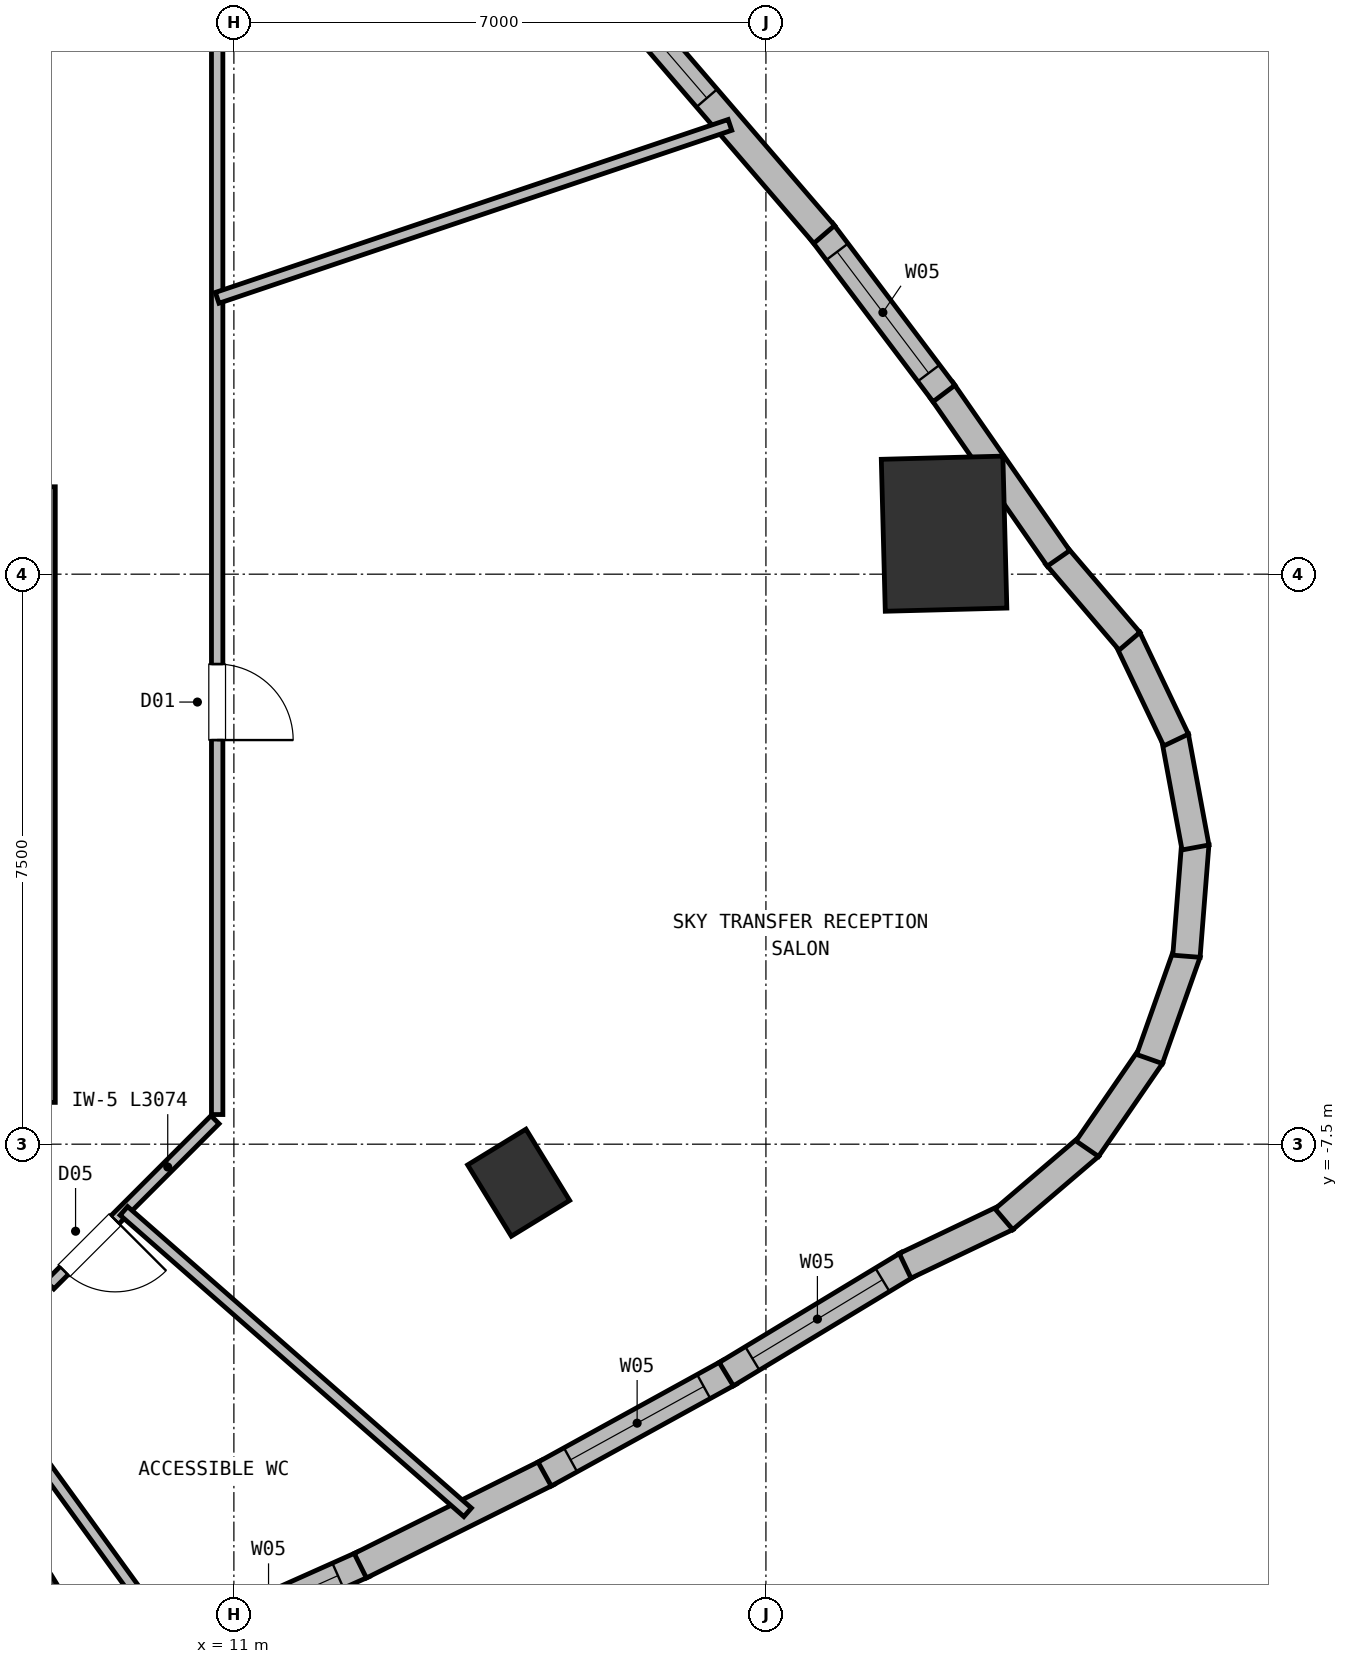
"""IFC4 building model, lengths in metres.
Left out: names, types, materials, properties, quantities, classifications, styles, units other than length and angle.
Written with IfcOpenShell. Run it as: python <this file> out.ifc"""

import sys

from ifc_helpers import new_model, si_unit, direction, frame, frame_2d, origin, origin_2d, place, context, subcontext, project, spatial, rectangle, extrude, element, fill, save


model = new_model("IFC4")
c1 = context("Model", 3, precision=1e-05, world=origin(), true_north=direction((0.0, 1.0)))
c2 = subcontext(c1, "Body", "Model", "MODEL_VIEW")
j1 = project(units=[si_unit("LENGTHUNIT", "METRE"), si_unit("PLANEANGLEUNIT", "RADIAN")], contexts=[c1])
p1 = place(None, origin())
s1 = spatial("IfcSite", under=j1, at=p1, CompositionType="ELEMENT")
p2 = place(p1, origin())
s2 = spatial("IfcBuilding", under=s1, at=p2, CompositionType="ELEMENT")
p3 = place(p2, frame((0.0, 0.0, 88.25)))
s3 = spatial("IfcBuildingStorey", under=s2, at=p3, CompositionType="ELEMENT", Elevation=88.25)
p4 = place(p3, frame((8.35, -6.95, 0.0), z_axis=(0.0, 0.0, 1.0), x_axis=(0.0, 1.0, 0.0)))
e1 = element("IfcWall", 1, at=p4, inside=s3, PredefinedType="SHEAR", context=c2, shape_type="SweptSolid", body=[
    extrude(rectangle(XDim=8.1, YDim=0.6, at=frame_2d((4.05, 0.0))), origin(), (0.0, 0.0, 1.0), 4.21),
])
for number, where, z_axis, x_axis in (
    (2, (8.504, -13.878, 0.0), (0.0, 0.0, 1.0), (0.853, 0.522, 0.0)),
    (3, (14.747, -8.007, 0.0), (0.0, 0.0, 1.0), (0.853, 0.522, 0.0)),
):
    element("IfcColumn", number, at=place(p3, frame(where, z_axis=z_axis, x_axis=x_axis)), inside=s3, PredefinedType="COLUMN", context=c2, shape_type="SweptSolid", body=[
        extrude(rectangle(XDim=0.9, YDim=1.1, at=origin_2d()), origin(), (0.0, 0.0, 1.0), 4.5),
    ])
p5 = place(p3, frame((20.344, 0.533, 0.0), z_axis=(0.0, 0.0, 1.0), x_axis=(0.999657324976, 0.026176948308, 0.0)))
e4 = element("IfcColumn", 4, at=p5, inside=s3, PredefinedType="COLUMN", context=c2, shape_type="SweptSolid", body=[
    extrude(rectangle(XDim=1.6, YDim=2.0, at=origin_2d()), origin(), (0.0, 0.0, 1.0), 4.5),
])
p6 = place(p3, frame((12.709, -13.025, 0.0), z_axis=(0.0, 0.0, 1.0), x_axis=(-0.913079911719, -0.407780669987, 0.0)))
e5 = element("IfcWall", 5, at=p6, inside=s3, PredefinedType="SOLIDWALL", context=c2, shape_type="SweptSolid", body=[
    extrude(rectangle(XDim=2.744, YDim=0.36, at=frame_2d((1.372, 0.0))), origin(), (0.0, 0.0, 1.0), 4.21),
])
p7 = place(p6, frame((0.372, 0.0, 0.72)))
e6 = element("IfcOpeningElement", 6, at=p7, cuts=e5, PredefinedType="OPENING", context=c2, shape_type="SweptSolid", body=[
    extrude(rectangle(XDim=2.0, YDim=2.15, at=frame_2d((1.0, 1.075))), frame((0.0, 0.19, 0.0), z_axis=(0.0, -1.0, 0.0), x_axis=(1.0, 0.0, 0.0)), (0.0, 0.0, 1.0), 0.38),
])
p8 = place(p3, frame((15.133, -11.817, 0.0), z_axis=(0.0, 0.0, 1.0), x_axis=(-0.89522231214, -0.445619806389, 0.0)))
e7 = element("IfcWall", 7, at=p8, inside=s3, PredefinedType="SOLIDWALL", context=c2, shape_type="SweptSolid", body=[
    extrude(rectangle(XDim=2.759, YDim=0.36, at=frame_2d((1.379, 0.0))), origin(), (0.0, 0.0, 1.0), 4.21),
])
p9 = place(p3, frame((17.522, -10.501, 0.0), z_axis=(0.0, 0.0, 1.0), x_axis=(-0.876024703061, -0.482266233139, 0.0)))
e8 = element("IfcWall", 8, at=p9, inside=s3, PredefinedType="SOLIDWALL", context=c2, shape_type="SweptSolid", body=[
    extrude(rectangle(XDim=2.778, YDim=0.36, at=frame_2d((1.389, 0.0))), origin(), (0.0, 0.0, 1.0), 4.21),
])
p10 = place(p9, frame((0.389, 0.0, 0.72)))
e9 = element("IfcOpeningElement", 9, at=p10, cuts=e8, PredefinedType="OPENING", context=c2, shape_type="SweptSolid", body=[
    extrude(rectangle(XDim=2.0, YDim=2.15, at=frame_2d((1.0, 1.075))), frame((0.0, 0.19, 0.0), z_axis=(0.0, -1.0, 0.0), x_axis=(1.0, 0.0, 0.0)), (0.0, 0.0, 1.0), 0.38),
])
p11 = place(p3, frame((19.876, -9.077, 0.0), z_axis=(0.0, 0.0, 1.0), x_axis=(-0.855749933122, -0.517389651967, 0.0)))
e10 = element("IfcWall", 10, at=p11, inside=s3, PredefinedType="SOLIDWALL", context=c2, shape_type="SweptSolid", body=[
    extrude(rectangle(XDim=2.801, YDim=0.36, at=frame_2d((1.4, 0.0))), origin(), (0.0, 0.0, 1.0), 4.21),
])
p12 = place(p11, frame((0.401, 0.0, 0.72)))
e11 = element("IfcOpeningElement", 11, at=p12, cuts=e10, PredefinedType="OPENING", context=c2, shape_type="SweptSolid", body=[
    extrude(rectangle(XDim=2.0, YDim=2.15, at=frame_2d((1.0, 1.075))), frame((0.0, 0.19, 0.0), z_axis=(0.0, -1.0, 0.0), x_axis=(1.0, 0.0, 0.0)), (0.0, 0.0, 1.0), 0.38),
])
p13 = place(p3, frame((21.173, -8.461, 0.0), z_axis=(0.0, 0.0, 1.0), x_axis=(-0.902523129088, -0.430641383823, 0.0)))
e12 = element("IfcWall", 12, at=p13, inside=s3, PredefinedType="SOLIDWALL", context=c2, shape_type="SweptSolid", body=[
    extrude(rectangle(XDim=1.486, YDim=0.36, at=frame_2d((0.743, 0.0))), origin(), (0.0, 0.0, 1.0), 4.21),
])
p14 = place(p3, frame((22.261, -7.523, 0.0), z_axis=(0.0, 0.0, 1.0), x_axis=(-0.760392276745, -0.649464075578, 0.0)))
e13 = element("IfcWall", 13, at=p14, inside=s3, PredefinedType="SOLIDWALL", context=c2, shape_type="SweptSolid", body=[
    extrude(rectangle(XDim=1.486, YDim=0.36, at=frame_2d((0.743, 0.0))), origin(), (0.0, 0.0, 1.0), 4.21),
])
p15 = place(p3, frame((23.07, -6.335, 0.0), z_axis=(0.0, 0.0, 1.0), x_axis=(-0.56647304132, -0.824080271247, 0.0)))
e14 = element("IfcWall", 14, at=p15, inside=s3, PredefinedType="SOLIDWALL", context=c2, shape_type="SweptSolid", body=[
    extrude(rectangle(XDim=1.486, YDim=0.36, at=frame_2d((0.743, 0.0))), origin(), (0.0, 0.0, 1.0), 4.21),
])
for number, where, z_axis, x_axis in (
    (15, (23.543, -4.979, 0.0), (0.0, 0.0, 1.0), (-0.334, -0.943, 0.0)),
    (16, (23.649, -3.546, 0.0), (0.0, 0.0, 1.0), (-0.078, -0.997, 0.0)),
    (17, (23.381, -2.135, 0.0), (0.0, 0.0, 1.0), (0.182, -0.983, 0.0)),
    (18, (22.757, -0.841, 0.0), (0.0, 0.0, 1.0), (0.431, -0.903, 0.0)),
):
    element("IfcWall", number, at=place(p3, frame(where, z_axis=z_axis, x_axis=x_axis)), inside=s3, PredefinedType="SOLIDWALL", context=c2, shape_type="SweptSolid", body=[
        extrude(rectangle(XDim=1.486, YDim=0.36, at=frame_2d((0.743, 0.0))), origin(), (0.0, 0.0, 1.0), 4.21),
    ])
p16 = place(p3, frame((21.819, 0.247, 0.0), z_axis=(0.0, 0.0, 1.0), x_axis=(0.649464075578, -0.760392276745, 0.0)))
e19 = element("IfcWall", 19, at=p16, inside=s3, PredefinedType="SOLIDWALL", context=c2, shape_type="SweptSolid", body=[
    extrude(rectangle(XDim=1.486, YDim=0.36, at=frame_2d((0.743, 0.0))), origin(), (0.0, 0.0, 1.0), 4.21),
])
p17 = place(p3, frame((20.313, 2.418, 0.0), z_axis=(0.0, 0.0, 1.0), x_axis=(0.570713634392, -0.821149162771, 0.0)))
e20 = element("IfcWall", 20, at=p17, inside=s3, PredefinedType="SOLIDWALL", context=c2, shape_type="SweptSolid", body=[
    extrude(rectangle(XDim=2.692, YDim=0.36, at=frame_2d((1.346, 0.0))), origin(), (0.0, 0.0, 1.0), 4.21),
])
p18 = place(p3, frame((18.735, 4.509, 0.0), z_axis=(0.0, 0.0, 1.0), x_axis=(0.602250802705, -0.798306940118, 0.0)))
e21 = element("IfcWall", 21, at=p18, inside=s3, PredefinedType="SOLIDWALL", context=c2, shape_type="SweptSolid", body=[
    extrude(rectangle(XDim=2.67, YDim=0.36, at=frame_2d((1.335, 0.0))), origin(), (0.0, 0.0, 1.0), 4.21),
])
p19 = place(p18, frame((0.335, 0.0, 0.72)))
e22 = element("IfcOpeningElement", 22, at=p19, cuts=e21, PredefinedType="OPENING", context=c2, shape_type="SweptSolid", body=[
    extrude(rectangle(XDim=2.0, YDim=2.15, at=frame_2d((1.0, 1.075))), frame((0.0, 0.19, 0.0), z_axis=(0.0, -1.0, 0.0), x_axis=(1.0, 0.0, 0.0)), (0.0, 0.0, 1.0), 0.38),
])
p20 = place(p3, frame((14.966, 8.887, 0.0), z_axis=(0.0, 0.0, 1.0), x_axis=(0.65220496226, -0.758042668458, 0.0)))
e23 = element("IfcWall", 23, at=p20, inside=s3, PredefinedType="SOLIDWALL", context=c2, shape_type="SweptSolid", body=[
    extrude(rectangle(XDim=5.827, YDim=0.36, at=frame_2d((2.914, 0.0))), origin(), (0.0, 0.0, 1.0), 4.21),
])
p21 = place(p20, frame((1.46, 0.0, 0.72)))
e24 = element("IfcOpeningElement", 24, at=p21, cuts=e23, PredefinedType="OPENING", context=c2, shape_type="SweptSolid", body=[
    extrude(rectangle(XDim=2.0, YDim=2.15, at=frame_2d((1.0, 1.075))), frame((0.0, 0.19, 0.0), z_axis=(0.0, -1.0, 0.0), x_axis=(1.0, 0.0, 0.0)), (0.0, 0.0, 1.0), 0.38),
])
p22 = place(p3, frame((10.752, -7.178, 0.0), z_axis=(0.0, 0.0, 1.0), x_axis=(-0.707067066127, -0.707146494016, 0.0)))
e25 = element("IfcWall", 25, at=p22, inside=s3, PredefinedType="PARTITIONING", context=c2, shape_type="SweptSolid", body=[
    extrude(rectangle(XDim=3.074, YDim=0.15, at=frame_2d((1.537, 0.0))), origin(), (0.0, 0.0, 1.0), 4.21),
])
p23 = place(p22, frame((1.86, 0.0, 0.0)))
e26 = element("IfcOpeningElement", 26, at=p23, cuts=e25, PredefinedType="OPENING", context=c2, shape_type="SweptSolid", body=[
    extrude(rectangle(XDim=0.95, YDim=2.1, at=frame_2d((0.475, 1.05))), frame((0.0, 0.085, 0.0), z_axis=(0.0, -1.0, 0.0), x_axis=(1.0, 0.0, 0.0)), (0.0, 0.0, 1.0), 0.17),
])
p24 = place(p3, frame((10.78, 7.11, 0.0), z_axis=(0.0, 0.0, 1.0), x_axis=(0.0, -1.0, 0.0)))
e27 = element("IfcWall", 27, at=p24, inside=s3, PredefinedType="PARTITIONING", context=c2, shape_type="SweptSolid", body=[
    extrude(rectangle(XDim=14.22, YDim=0.15, at=frame_2d((7.11, 0.0))), origin(), (0.0, 0.0, 1.0), 4.21),
])
p25 = place(p24, frame((8.292, 0.0, 0.0)))
e28 = element("IfcOpeningElement", 28, at=p25, cuts=e27, PredefinedType="OPENING", context=c2, shape_type="SweptSolid", body=[
    extrude(rectangle(XDim=1.0, YDim=2.15, at=frame_2d((0.5, 1.075))), frame((0.0, 0.085, 0.0), z_axis=(0.0, -1.0, 0.0), x_axis=(1.0, 0.0, 0.0)), (0.0, 0.0, 1.0), 0.17),
])
p26 = place(p3, frame((9.552, -8.377, 0.0), z_axis=(0.0, 0.0, 1.0), x_axis=(0.751819466932, -0.659369008327, 0.0)))
e29 = element("IfcWall", 29, at=p26, inside=s3, PredefinedType="PARTITIONING", context=c2, shape_type="SweptSolid", body=[
    extrude(rectangle(XDim=6.016, YDim=0.15, at=frame_2d((3.008, 0.0))), origin(), (0.0, 0.0, 1.0), 4.21),
])
p27 = place(p3, frame((10.78, 3.636, 0.0), z_axis=(0.0, 0.0, 1.0), x_axis=(0.947556026785, 0.319589699621, 0.0)))
e30 = element("IfcWall", 30, at=p27, inside=s3, PredefinedType="PARTITIONING", context=c2, shape_type="SweptSolid", body=[
    extrude(rectangle(XDim=7.12, YDim=0.15, at=frame_2d((3.56, 0.0))), origin(), (0.0, 0.0, 1.0), 4.21),
])
p28 = place(p3, frame((6.802, -9.38, 0.0), z_axis=(0.0, 0.0, 1.0), x_axis=(0.587049456682, -0.809551070291, 0.0)))
e31 = element("IfcWall", 31, at=p28, inside=s3, PredefinedType="PARTITIONING", context=c2, shape_type="SweptSolid", body=[
    extrude(rectangle(XDim=5.863, YDim=0.15, at=frame_2d((2.931, 0.0))), origin(), (0.0, 0.0, 1.0), 4.21),
])
p29 = place(p7, origin())
e32 = element("IfcWindow", 32, at=p29, inside=s3, PartitioningType="SINGLE_PANEL", PredefinedType="WINDOW", context=c2, shape_type="SweptSolid", body=[
    extrude(rectangle(XDim=2.0, YDim=2.15, at=frame_2d((1.0, 1.075))), frame((0.0, 0.03, 0.0), z_axis=(0.0, -1.0, 0.0), x_axis=(1.0, 0.0, 0.0)), (0.0, 0.0, 1.0), 0.06),
])
fill(e6, e32)
p30 = place(p10, origin())
e33 = element("IfcWindow", 33, at=p30, inside=s3, PartitioningType="SINGLE_PANEL", PredefinedType="WINDOW", context=c2, shape_type="SweptSolid", body=[
    extrude(rectangle(XDim=2.0, YDim=2.15, at=frame_2d((1.0, 1.075))), frame((0.0, 0.03, 0.0), z_axis=(0.0, -1.0, 0.0), x_axis=(1.0, 0.0, 0.0)), (0.0, 0.0, 1.0), 0.06),
])
fill(e9, e33)
p31 = place(p12, origin())
e34 = element("IfcWindow", 34, at=p31, inside=s3, PartitioningType="SINGLE_PANEL", PredefinedType="WINDOW", context=c2, shape_type="SweptSolid", body=[
    extrude(rectangle(XDim=2.0, YDim=2.15, at=frame_2d((1.0, 1.075))), frame((0.0, 0.03, 0.0), z_axis=(0.0, -1.0, 0.0), x_axis=(1.0, 0.0, 0.0)), (0.0, 0.0, 1.0), 0.06),
])
fill(e11, e34)
p32 = place(p19, origin())
e35 = element("IfcWindow", 35, at=p32, inside=s3, PartitioningType="SINGLE_PANEL", PredefinedType="WINDOW", context=c2, shape_type="SweptSolid", body=[
    extrude(rectangle(XDim=2.0, YDim=2.15, at=frame_2d((1.0, 1.075))), frame((0.0, 0.03, 0.0), z_axis=(0.0, -1.0, 0.0), x_axis=(1.0, 0.0, 0.0)), (0.0, 0.0, 1.0), 0.06),
])
fill(e22, e35)
p33 = place(p21, origin())
e36 = element("IfcWindow", 36, at=p33, inside=s3, PartitioningType="SINGLE_PANEL", PredefinedType="WINDOW", context=c2, shape_type="SweptSolid", body=[
    extrude(rectangle(XDim=2.0, YDim=2.15, at=frame_2d((1.0, 1.075))), frame((0.0, 0.03, 0.0), z_axis=(0.0, -1.0, 0.0), x_axis=(1.0, 0.0, 0.0)), (0.0, 0.0, 1.0), 0.06),
])
fill(e24, e36)
p34 = place(p23, origin())
e37 = element("IfcDoor", 37, at=p34, inside=s3, OperationType="SINGLE_SWING_LEFT", PredefinedType="DOOR", context=c2, shape_type="SweptSolid", body=[
    extrude(rectangle(XDim=0.95, YDim=2.1, at=frame_2d((0.475, 1.05))), frame((0.0, 0.025, 0.0), z_axis=(0.0, -1.0, 0.0), x_axis=(1.0, 0.0, 0.0)), (0.0, 0.0, 1.0), 0.05),
])
fill(e26, e37)
p35 = place(p25, origin())
e38 = element("IfcDoor", 38, at=p35, inside=s3, OperationType="SINGLE_SWING_RIGHT", PredefinedType="DOOR", context=c2, shape_type="SweptSolid", body=[
    extrude(rectangle(XDim=1.0, YDim=2.15, at=frame_2d((0.5, 1.075))), frame((0.0, 0.025, 0.0), z_axis=(0.0, -1.0, 0.0), x_axis=(1.0, 0.0, 0.0)), (0.0, 0.0, 1.0), 0.05),
])
fill(e28, e38)
save(model, sys.argv[1])
